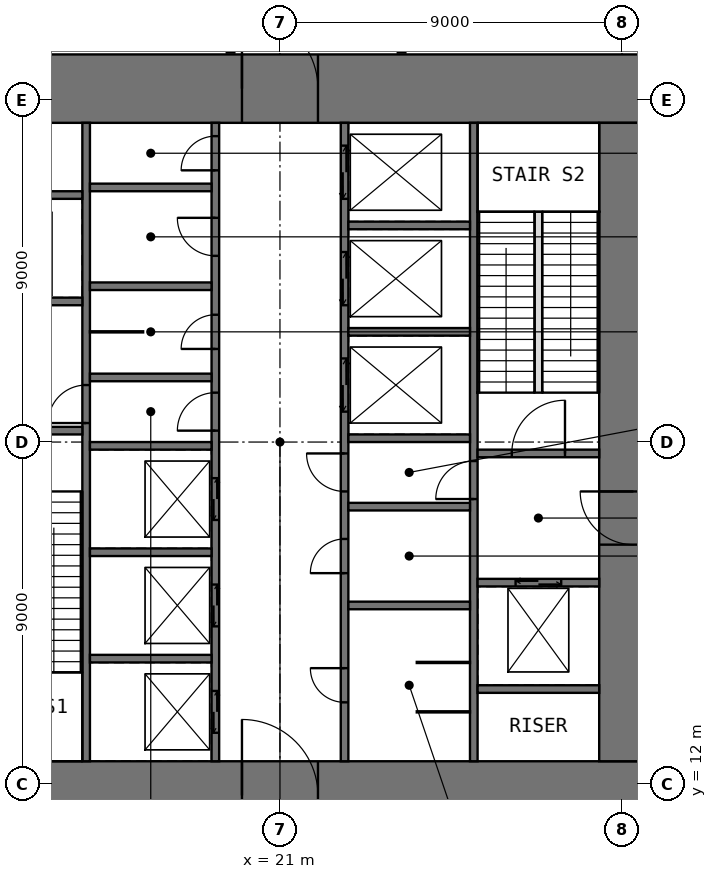
"""IFC4 building model, lengths in metres.
Left out: names, types, materials, properties, quantities, classifications, styles, units other than length and angle.
Written with IfcOpenShell. Run it as: python <this file> out.ifc"""

import sys

from ifc_helpers import new_model, si_unit, direction, frame, frame_2d, origin, place, context, subcontext, project, spatial, rectangle, extrude, element, fill, save


model = new_model("IFC4")
c1 = context("Model", 3, precision=1e-05, world=origin(), true_north=direction((0.0, 1.0)))
c2 = subcontext(c1, "Body", "Model", "MODEL_VIEW")
j1 = project(units=[si_unit("LENGTHUNIT", "METRE"), si_unit("PLANEANGLEUNIT", "RADIAN")], contexts=[c1])
p1 = place(None, origin())
s1 = spatial("IfcSite", under=j1, at=p1, CompositionType="ELEMENT")
p2 = place(p1, origin())
s2 = spatial("IfcBuilding", under=s1, at=p2, CompositionType="ELEMENT")
p3 = place(p2, origin())
s3 = spatial("IfcBuildingStorey", under=s2, at=p3, CompositionType="ELEMENT", Elevation=0.0)
p4 = place(p3, frame((10.8, 11.7, 0.0), z_axis=(0.0, 0.0, 1.0), x_axis=(1.0, 0.0, 0.0)))
e1 = element("IfcWall", 1, at=p4, inside=s3, PredefinedType="SHEAR", context=c2, shape_type="SweptSolid", body=[
    extrude(rectangle(XDim=20.4, YDim=1.8, at=frame_2d((10.2, 0.0))), origin(), (0.0, 0.0, 1.0), 5.8),
])
p5 = place(p4, frame((9.2, 0.0, 0.0)))
e2 = element("IfcOpeningElement", 2, at=p5, cuts=e1, PredefinedType="OPENING", context=c2, shape_type="SweptSolid", body=[
    extrude(rectangle(XDim=2.0, YDim=2.2, at=frame_2d((1.0, 1.1))), frame((0.0, 0.91, 0.0), z_axis=(0.0, -1.0, 0.0), x_axis=(1.0, 0.0, 0.0)), (0.0, 0.0, 1.0), 1.82),
])
p6 = place(p3, frame((10.8, 30.3, 0.0), z_axis=(0.0, 0.0, 1.0), x_axis=(1.0, 0.0, 0.0)))
e3 = element("IfcWall", 3, at=p6, inside=s3, PredefinedType="SHEAR", context=c2, shape_type="SweptSolid", body=[
    extrude(rectangle(XDim=20.4, YDim=1.8, at=frame_2d((10.2, 0.0))), origin(), (0.0, 0.0, 1.0), 5.8),
])
p7 = place(p6, frame((9.2, 0.0, 0.0)))
e4 = element("IfcOpeningElement", 4, at=p7, cuts=e3, PredefinedType="OPENING", context=c2, shape_type="SweptSolid", body=[
    extrude(rectangle(XDim=2.0, YDim=2.2, at=frame_2d((1.0, 1.1))), frame((0.0, 0.91, 0.0), z_axis=(0.0, -1.0, 0.0), x_axis=(1.0, 0.0, 0.0)), (0.0, 0.0, 1.0), 1.82),
])
p8 = place(p3, frame((30.3, 12.6, 0.0), z_axis=(0.0, 0.0, 1.0), x_axis=(0.0, 1.0, 0.0)))
e5 = element("IfcWall", 5, at=p8, inside=s3, PredefinedType="SHEAR", context=c2, shape_type="SweptSolid", body=[
    extrude(rectangle(XDim=16.8, YDim=1.8, at=frame_2d((8.4, 0.0))), origin(), (0.0, 0.0, 1.0), 5.8),
])
p9 = place(p8, frame((5.7, 0.0, 0.0)))
e6 = element("IfcOpeningElement", 6, at=p9, cuts=e5, PredefinedType="OPENING", context=c2, shape_type="SweptSolid", body=[
    extrude(rectangle(XDim=1.4, YDim=2.2, at=frame_2d((0.7, 1.1))), frame((0.0, 0.91, 0.0), z_axis=(0.0, -1.0, 0.0), x_axis=(1.0, 0.0, 0.0)), (0.0, 0.0, 1.0), 1.82),
])
p10 = place(p3, frame((15.9, 12.6, 0.0), z_axis=(0.0, 0.0, 1.0), x_axis=(0.0, 1.0, 0.0)))
e7 = element("IfcWall", 7, at=p10, inside=s3, PredefinedType="SHEAR", context=c2, shape_type="SweptSolid", body=[
    extrude(rectangle(XDim=16.8, YDim=0.2, at=frame_2d((8.4, 0.0))), origin(), (0.0, 0.0, 1.0), 5.8),
])
p11 = place(p10, frame((8.9, 0.0, 0.0)))
e8 = element("IfcOpeningElement", 8, at=p11, cuts=e7, PredefinedType="OPENING", context=c2, shape_type="SweptSolid", body=[
    extrude(rectangle(XDim=1.0, YDim=2.2, at=frame_2d((0.5, 1.1))), frame((0.0, 0.11, 0.0), z_axis=(0.0, -1.0, 0.0), x_axis=(1.0, 0.0, 0.0)), (0.0, 0.0, 1.0), 0.22),
])
p12 = place(p3, frame((19.3, 12.6, 0.0), z_axis=(0.0, 0.0, 1.0), x_axis=(0.0, 1.0, 0.0)))
e9 = element("IfcWall", 9, at=p12, inside=s3, PredefinedType="SHEAR", context=c2, shape_type="SweptSolid", body=[
    extrude(rectangle(XDim=16.8, YDim=0.2, at=frame_2d((8.4, 0.0))), origin(), (0.0, 0.0, 1.0), 5.8),
])
p13 = place(p12, frame((8.7, 0.0, 0.0)))
e10 = element("IfcOpeningElement", 10, at=p13, cuts=e9, PredefinedType="OPENING", context=c2, shape_type="SweptSolid", body=[
    extrude(rectangle(XDim=1.0, YDim=2.2, at=frame_2d((0.5, 1.1))), frame((0.0, 0.11, 0.0), z_axis=(0.0, -1.0, 0.0), x_axis=(1.0, 0.0, 0.0)), (0.0, 0.0, 1.0), 0.22),
])
p14 = place(p12, frame((10.85, 0.0, 0.0)))
e11 = element("IfcOpeningElement", 11, at=p14, cuts=e9, PredefinedType="OPENING", context=c2, shape_type="SweptSolid", body=[
    extrude(rectangle(XDim=0.9, YDim=2.2, at=frame_2d((0.45, 1.1))), frame((0.0, 0.11, 0.0), z_axis=(0.0, -1.0, 0.0), x_axis=(1.0, 0.0, 0.0)), (0.0, 0.0, 1.0), 0.22),
])
p15 = place(p12, frame((13.3, 0.0, 0.0)))
e12 = element("IfcOpeningElement", 12, at=p15, cuts=e9, PredefinedType="OPENING", context=c2, shape_type="SweptSolid", body=[
    extrude(rectangle(XDim=1.0, YDim=2.2, at=frame_2d((0.5, 1.1))), frame((0.0, 0.11, 0.0), z_axis=(0.0, -1.0, 0.0), x_axis=(1.0, 0.0, 0.0)), (0.0, 0.0, 1.0), 0.22),
])
p16 = place(p12, frame((15.55, 0.0, 0.0)))
e13 = element("IfcOpeningElement", 13, at=p16, cuts=e9, PredefinedType="OPENING", context=c2, shape_type="SweptSolid", body=[
    extrude(rectangle(XDim=0.9, YDim=2.2, at=frame_2d((0.45, 1.1))), frame((0.0, 0.11, 0.0), z_axis=(0.0, -1.0, 0.0), x_axis=(1.0, 0.0, 0.0)), (0.0, 0.0, 1.0), 0.22),
])
p17 = place(p12, frame((0.75, 0.0, 0.0)))
e14 = element("IfcOpeningElement", 14, at=p17, cuts=e9, PredefinedType="OPENING", context=c2, shape_type="SweptSolid", body=[
    extrude(rectangle(XDim=1.1, YDim=2.2, at=frame_2d((0.55, 1.1))), frame((0.0, 0.11, 0.0), z_axis=(0.0, -1.0, 0.0), x_axis=(1.0, 0.0, 0.0)), (0.0, 0.0, 1.0), 0.22),
])
p18 = place(p12, frame((3.55, 0.0, 0.0)))
e15 = element("IfcOpeningElement", 15, at=p18, cuts=e9, PredefinedType="OPENING", context=c2, shape_type="SweptSolid", body=[
    extrude(rectangle(XDim=1.1, YDim=2.2, at=frame_2d((0.55, 1.1))), frame((0.0, 0.11, 0.0), z_axis=(0.0, -1.0, 0.0), x_axis=(1.0, 0.0, 0.0)), (0.0, 0.0, 1.0), 0.22),
])
p19 = place(p12, frame((6.35, 0.0, 0.0)))
e16 = element("IfcOpeningElement", 16, at=p19, cuts=e9, PredefinedType="OPENING", context=c2, shape_type="SweptSolid", body=[
    extrude(rectangle(XDim=1.1, YDim=2.2, at=frame_2d((0.55, 1.1))), frame((0.0, 0.11, 0.0), z_axis=(0.0, -1.0, 0.0), x_axis=(1.0, 0.0, 0.0)), (0.0, 0.0, 1.0), 0.22),
])
p20 = place(p3, frame((22.7, 12.6, 0.0), z_axis=(0.0, 0.0, 1.0), x_axis=(0.0, 1.0, 0.0)))
e17 = element("IfcWall", 17, at=p20, inside=s3, PredefinedType="SHEAR", context=c2, shape_type="SweptSolid", body=[
    extrude(rectangle(XDim=16.8, YDim=0.2, at=frame_2d((8.4, 0.0))), origin(), (0.0, 0.0, 1.0), 5.8),
])
p21 = place(p20, frame((7.1, 0.0, 0.0)))
e18 = element("IfcOpeningElement", 18, at=p21, cuts=e17, PredefinedType="OPENING", context=c2, shape_type="SweptSolid", body=[
    extrude(rectangle(XDim=1.0, YDim=2.2, at=frame_2d((0.5, 1.1))), frame((0.0, 0.11, 0.0), z_axis=(0.0, -1.0, 0.0), x_axis=(1.0, 0.0, 0.0)), (0.0, 0.0, 1.0), 0.22),
])
p22 = place(p20, frame((1.55, 0.0, 0.0)))
e19 = element("IfcOpeningElement", 19, at=p22, cuts=e17, PredefinedType="OPENING", context=c2, shape_type="SweptSolid", body=[
    extrude(rectangle(XDim=0.9, YDim=2.2, at=frame_2d((0.45, 1.1))), frame((0.0, 0.11, 0.0), z_axis=(0.0, -1.0, 0.0), x_axis=(1.0, 0.0, 0.0)), (0.0, 0.0, 1.0), 0.22),
])
p23 = place(p20, frame((4.95, 0.0, 0.0)))
e20 = element("IfcOpeningElement", 20, at=p23, cuts=e17, PredefinedType="OPENING", context=c2, shape_type="SweptSolid", body=[
    extrude(rectangle(XDim=0.9, YDim=2.2, at=frame_2d((0.45, 1.1))), frame((0.0, 0.11, 0.0), z_axis=(0.0, -1.0, 0.0), x_axis=(1.0, 0.0, 0.0)), (0.0, 0.0, 1.0), 0.22),
])
p24 = place(p20, frame((9.2, 0.0, 0.0)))
e21 = element("IfcOpeningElement", 21, at=p24, cuts=e17, PredefinedType="OPENING", context=c2, shape_type="SweptSolid", body=[
    extrude(rectangle(XDim=1.4, YDim=2.4, at=frame_2d((0.7, 1.2))), frame((0.0, 0.11, 0.0), z_axis=(0.0, -1.0, 0.0), x_axis=(1.0, 0.0, 0.0)), (0.0, 0.0, 1.0), 0.22),
])
p25 = place(p20, frame((12.0, 0.0, 0.0)))
e22 = element("IfcOpeningElement", 22, at=p25, cuts=e17, PredefinedType="OPENING", context=c2, shape_type="SweptSolid", body=[
    extrude(rectangle(XDim=1.4, YDim=2.4, at=frame_2d((0.7, 1.2))), frame((0.0, 0.11, 0.0), z_axis=(0.0, -1.0, 0.0), x_axis=(1.0, 0.0, 0.0)), (0.0, 0.0, 1.0), 0.22),
])
p26 = place(p20, frame((14.8, 0.0, 0.0)))
e23 = element("IfcOpeningElement", 23, at=p26, cuts=e17, PredefinedType="OPENING", context=c2, shape_type="SweptSolid", body=[
    extrude(rectangle(XDim=1.4, YDim=2.4, at=frame_2d((0.7, 1.2))), frame((0.0, 0.11, 0.0), z_axis=(0.0, -1.0, 0.0), x_axis=(1.0, 0.0, 0.0)), (0.0, 0.0, 1.0), 0.22),
])
p27 = place(p3, frame((26.1, 12.6, 0.0), z_axis=(0.0, 0.0, 1.0), x_axis=(0.0, 1.0, 0.0)))
e24 = element("IfcWall", 24, at=p27, inside=s3, PredefinedType="SHEAR", context=c2, shape_type="SweptSolid", body=[
    extrude(rectangle(XDim=16.8, YDim=0.2, at=frame_2d((8.4, 0.0))), origin(), (0.0, 0.0, 1.0), 5.8),
])
p28 = place(p27, frame((6.9, 0.0, 0.0)))
e25 = element("IfcOpeningElement", 25, at=p28, cuts=e24, PredefinedType="OPENING", context=c2, shape_type="SweptSolid", body=[
    extrude(rectangle(XDim=1.0, YDim=2.2, at=frame_2d((0.5, 1.1))), frame((0.0, 0.11, 0.0), z_axis=(0.0, -1.0, 0.0), x_axis=(1.0, 0.0, 0.0)), (0.0, 0.0, 1.0), 0.22),
])
p29 = place(p3, frame((12.6, 21.3, 0.0), z_axis=(0.0, 0.0, 1.0), x_axis=(1.0, 0.0, 0.0)))
e26 = element("IfcWall", 26, at=p29, inside=s3, PredefinedType="SHEAR", context=c2, shape_type="SweptSolid", body=[
    extrude(rectangle(XDim=3.2, YDim=0.2, at=frame_2d((1.6, 0.0))), origin(), (0.0, 0.0, 1.0), 5.8),
])
p30 = place(p29, frame((0.9, 0.0, 0.0)))
e27 = element("IfcOpeningElement", 27, at=p30, cuts=e26, PredefinedType="OPENING", context=c2, shape_type="SweptSolid", body=[
    extrude(rectangle(XDim=1.4, YDim=2.2, at=frame_2d((0.7, 1.1))), frame((0.0, 0.11, 0.0), z_axis=(0.0, -1.0, 0.0), x_axis=(1.0, 0.0, 0.0)), (0.0, 0.0, 1.0), 0.22),
])
p31 = place(p3, frame((12.6, 24.7, 0.0), z_axis=(0.0, 0.0, 1.0), x_axis=(1.0, 0.0, 0.0)))
e28 = element("IfcWall", 28, at=p31, inside=s3, PredefinedType="SHEAR", context=c2, shape_type="SweptSolid", body=[
    extrude(rectangle(XDim=3.2, YDim=0.2, at=frame_2d((1.6, 0.0))), origin(), (0.0, 0.0, 1.0), 5.8),
])
p32 = place(p31, frame((1.0, 0.0, 0.0)))
e29 = element("IfcOpeningElement", 29, at=p32, cuts=e28, PredefinedType="OPENING", context=c2, shape_type="SweptSolid", body=[
    extrude(rectangle(XDim=1.2, YDim=2.2, at=frame_2d((0.6, 1.1))), frame((0.0, 0.11, 0.0), z_axis=(0.0, -1.0, 0.0), x_axis=(1.0, 0.0, 0.0)), (0.0, 0.0, 1.0), 0.22),
])
for number, where, z_axis, x_axis in (
    (30, (12.6, 27.5, 0.0), (0.0, 0.0, 1.0), (1.0, 0.0, 0.0)),
    (31, (16.0, 15.3, 0.0), (0.0, 0.0, 1.0), (1.0, 0.0, 0.0)),
    (32, (16.0, 18.1, 0.0), (0.0, 0.0, 1.0), (1.0, 0.0, 0.0)),
    (33, (16.0, 20.9, 0.0), (0.0, 0.0, 1.0), (1.0, 0.0, 0.0)),
    (34, (16.0, 22.7, 0.0), (0.0, 0.0, 1.0), (1.0, 0.0, 0.0)),
    (35, (16.0, 25.1, 0.0), (0.0, 0.0, 1.0), (1.0, 0.0, 0.0)),
    (36, (16.0, 27.7, 0.0), (0.0, 0.0, 1.0), (1.0, 0.0, 0.0)),
    (37, (22.8, 16.7, 0.0), (0.0, 0.0, 1.0), (1.0, 0.0, 0.0)),
    (38, (22.8, 19.3, 0.0), (0.0, 0.0, 1.0), (1.0, 0.0, 0.0)),
    (39, (22.8, 21.1, 0.0), (0.0, 0.0, 1.0), (1.0, 0.0, 0.0)),
    (40, (22.8, 23.9, 0.0), (0.0, 0.0, 1.0), (1.0, 0.0, 0.0)),
    (41, (22.8, 26.7, 0.0), (0.0, 0.0, 1.0), (1.0, 0.0, 0.0)),
    (42, (26.2, 14.5, 0.0), (0.0, 0.0, 1.0), (1.0, 0.0, 0.0)),
):
    element("IfcWall", number, at=place(p3, frame(where, z_axis=z_axis, x_axis=x_axis)), inside=s3, PredefinedType="SHEAR", context=c2, shape_type="SweptSolid", body=[
        extrude(rectangle(XDim=3.2, YDim=0.2, at=frame_2d((1.6, 0.0))), origin(), (0.0, 0.0, 1.0), 5.8),
    ])
p33 = place(p3, frame((26.2, 17.3, 0.0), z_axis=(0.0, 0.0, 1.0), x_axis=(1.0, 0.0, 0.0)))
e43 = element("IfcWall", 43, at=p33, inside=s3, PredefinedType="SHEAR", context=c2, shape_type="SweptSolid", body=[
    extrude(rectangle(XDim=3.2, YDim=0.2, at=frame_2d((1.6, 0.0))), origin(), (0.0, 0.0, 1.0), 5.8),
])
p34 = place(p33, frame((1.0, 0.0, 0.0)))
e44 = element("IfcOpeningElement", 44, at=p34, cuts=e43, PredefinedType="OPENING", context=c2, shape_type="SweptSolid", body=[
    extrude(rectangle(XDim=1.2, YDim=2.2, at=frame_2d((0.6, 1.1))), frame((0.0, 0.11, 0.0), z_axis=(0.0, -1.0, 0.0), x_axis=(1.0, 0.0, 0.0)), (0.0, 0.0, 1.0), 0.22),
])
p35 = place(p3, frame((26.2, 20.7, 0.0), z_axis=(0.0, 0.0, 1.0), x_axis=(1.0, 0.0, 0.0)))
e45 = element("IfcWall", 45, at=p35, inside=s3, PredefinedType="SHEAR", context=c2, shape_type="SweptSolid", body=[
    extrude(rectangle(XDim=3.2, YDim=0.2, at=frame_2d((1.6, 0.0))), origin(), (0.0, 0.0, 1.0), 5.8),
])
p36 = place(p35, frame((0.9, 0.0, 0.0)))
e46 = element("IfcOpeningElement", 46, at=p36, cuts=e45, PredefinedType="OPENING", context=c2, shape_type="SweptSolid", body=[
    extrude(rectangle(XDim=1.4, YDim=2.2, at=frame_2d((0.7, 1.1))), frame((0.0, 0.11, 0.0), z_axis=(0.0, -1.0, 0.0), x_axis=(1.0, 0.0, 0.0)), (0.0, 0.0, 1.0), 0.22),
])
for number, where, z_axis, x_axis in (
    (47, (24.6, 13.9, 0.0), (0.0, 0.0, 1.0), (1.0, 0.0, 0.0)),
    (48, (24.6, 15.2, 0.0), (0.0, 0.0, 1.0), (1.0, 0.0, 0.0)),
    (49, (16.0, 23.9, 0.0), (0.0, 0.0, 1.0), (1.0, 0.0, 0.0)),
):
    element("IfcWall", number, at=place(p3, frame(where, z_axis=z_axis, x_axis=x_axis)), inside=s3, PredefinedType="PARTITIONING", context=c2, shape_type="SweptSolid", body=[
        extrude(rectangle(XDim=1.4, YDim=0.03, at=frame_2d((0.7, 0.0))), origin(), (0.0, 0.0, 1.0), 5.6),
    ])
p37 = place(p3, frame((27.8, 22.3, 0.0), z_axis=(0.0, 0.0, 1.0), x_axis=(0.0, 1.0, 0.0)))
e50 = element("IfcWall", 50, at=p37, inside=s3, PredefinedType="PARTITIONING", context=c2, shape_type="SweptSolid", body=[
    extrude(rectangle(XDim=4.76, YDim=0.2, at=frame_2d((2.38, 0.0))), origin(), (0.0, 0.0, 1.0), 6.0),
])
p38 = place(p5, origin())
e51 = element("IfcDoor", 51, at=p38, inside=s3, OperationType="DOUBLE_DOOR_SINGLE_SWING", PredefinedType="DOOR", context=c2, shape_type="SweptSolid", body=[
    extrude(rectangle(XDim=2.0, YDim=2.2, at=frame_2d((1.0, 1.1))), frame((0.0, 0.025, 0.0), z_axis=(0.0, -1.0, 0.0), x_axis=(1.0, 0.0, 0.0)), (0.0, 0.0, 1.0), 0.05),
])
fill(e2, e51)
p39 = place(p7, origin())
e52 = element("IfcDoor", 52, at=p39, inside=s3, OperationType="DOUBLE_DOOR_SINGLE_SWING", PredefinedType="DOOR", context=c2, shape_type="SweptSolid", body=[
    extrude(rectangle(XDim=2.0, YDim=2.2, at=frame_2d((1.0, 1.1))), frame((0.0, 0.025, 0.0), z_axis=(0.0, -1.0, 0.0), x_axis=(1.0, 0.0, 0.0)), (0.0, 0.0, 1.0), 0.05),
])
fill(e4, e52)
p40 = place(p9, origin())
e53 = element("IfcDoor", 53, at=p40, inside=s3, OperationType="SINGLE_SWING_RIGHT", PredefinedType="DOOR", context=c2, shape_type="SweptSolid", body=[
    extrude(rectangle(XDim=1.4, YDim=2.2, at=frame_2d((0.7, 1.1))), frame((0.0, 0.025, 0.0), z_axis=(0.0, -1.0, 0.0), x_axis=(1.0, 0.0, 0.0)), (0.0, 0.0, 1.0), 0.05),
])
fill(e6, e53)
p41 = place(p36, origin())
e54 = element("IfcDoor", 54, at=p41, inside=s3, OperationType="SINGLE_SWING_RIGHT", PredefinedType="DOOR", context=c2, shape_type="SweptSolid", body=[
    extrude(rectangle(XDim=1.4, YDim=2.2, at=frame_2d((0.7, 1.1))), frame((0.0, 0.025, 0.0), z_axis=(0.0, -1.0, 0.0), x_axis=(1.0, 0.0, 0.0)), (0.0, 0.0, 1.0), 0.05),
])
fill(e46, e54)
p42 = place(p11, origin())
e55 = element("IfcDoor", 55, at=p42, inside=s3, OperationType="SINGLE_SWING_LEFT", PredefinedType="DOOR", context=c2, shape_type="SweptSolid", body=[
    extrude(rectangle(XDim=1.0, YDim=2.2, at=frame_2d((0.5, 1.1))), frame((0.0, 0.025, 0.0), z_axis=(0.0, -1.0, 0.0), x_axis=(1.0, 0.0, 0.0)), (0.0, 0.0, 1.0), 0.05),
])
fill(e8, e55)
p43 = place(p28, origin())
e56 = element("IfcDoor", 56, at=p43, inside=s3, OperationType="SINGLE_SWING_LEFT", PredefinedType="DOOR", context=c2, shape_type="SweptSolid", body=[
    extrude(rectangle(XDim=1.0, YDim=2.2, at=frame_2d((0.5, 1.1))), frame((0.0, 0.025, 0.0), z_axis=(0.0, -1.0, 0.0), x_axis=(1.0, 0.0, 0.0)), (0.0, 0.0, 1.0), 0.05),
])
fill(e25, e56)
p44 = place(p13, origin())
e57 = element("IfcDoor", 57, at=p44, inside=s3, OperationType="SINGLE_SWING_LEFT", PredefinedType="DOOR", context=c2, shape_type="SweptSolid", body=[
    extrude(rectangle(XDim=1.0, YDim=2.2, at=frame_2d((0.5, 1.1))), frame((0.0, 0.025, 0.0), z_axis=(0.0, -1.0, 0.0), x_axis=(1.0, 0.0, 0.0)), (0.0, 0.0, 1.0), 0.05),
])
fill(e10, e57)
p45 = place(p21, origin())
e58 = element("IfcDoor", 58, at=p45, inside=s3, OperationType="SINGLE_SWING_RIGHT", PredefinedType="DOOR", context=c2, shape_type="SweptSolid", body=[
    extrude(rectangle(XDim=1.0, YDim=2.2, at=frame_2d((0.5, 1.1))), frame((0.0, 0.025, 0.0), z_axis=(0.0, -1.0, 0.0), x_axis=(1.0, 0.0, 0.0)), (0.0, 0.0, 1.0), 0.05),
])
fill(e18, e58)
p46 = place(p14, origin())
e59 = element("IfcDoor", 59, at=p46, inside=s3, OperationType="SINGLE_SWING_LEFT", PredefinedType="DOOR", context=c2, shape_type="SweptSolid", body=[
    extrude(rectangle(XDim=0.9, YDim=2.2, at=frame_2d((0.45, 1.1))), frame((0.0, 0.025, 0.0), z_axis=(0.0, -1.0, 0.0), x_axis=(1.0, 0.0, 0.0)), (0.0, 0.0, 1.0), 0.05),
])
fill(e11, e59)
p47 = place(p15, origin())
e60 = element("IfcDoor", 60, at=p47, inside=s3, OperationType="SINGLE_SWING_RIGHT", PredefinedType="DOOR", context=c2, shape_type="SweptSolid", body=[
    extrude(rectangle(XDim=1.0, YDim=2.2, at=frame_2d((0.5, 1.1))), frame((0.0, 0.025, 0.0), z_axis=(0.0, -1.0, 0.0), x_axis=(1.0, 0.0, 0.0)), (0.0, 0.0, 1.0), 0.05),
])
fill(e12, e60)
p48 = place(p16, origin())
e61 = element("IfcDoor", 61, at=p48, inside=s3, OperationType="SINGLE_SWING_LEFT", PredefinedType="DOOR", context=c2, shape_type="SweptSolid", body=[
    extrude(rectangle(XDim=0.9, YDim=2.2, at=frame_2d((0.45, 1.1))), frame((0.0, 0.025, 0.0), z_axis=(0.0, -1.0, 0.0), x_axis=(1.0, 0.0, 0.0)), (0.0, 0.0, 1.0), 0.05),
])
fill(e13, e61)
p49 = place(p22, origin())
e62 = element("IfcDoor", 62, at=p49, inside=s3, OperationType="SINGLE_SWING_RIGHT", PredefinedType="DOOR", context=c2, shape_type="SweptSolid", body=[
    extrude(rectangle(XDim=0.9, YDim=2.2, at=frame_2d((0.45, 1.1))), frame((0.0, 0.025, 0.0), z_axis=(0.0, -1.0, 0.0), x_axis=(1.0, 0.0, 0.0)), (0.0, 0.0, 1.0), 0.05),
])
fill(e19, e62)
p50 = place(p23, origin())
e63 = element("IfcDoor", 63, at=p50, inside=s3, OperationType="SINGLE_SWING_LEFT", PredefinedType="DOOR", context=c2, shape_type="SweptSolid", body=[
    extrude(rectangle(XDim=0.9, YDim=2.2, at=frame_2d((0.45, 1.1))), frame((0.0, 0.025, 0.0), z_axis=(0.0, -1.0, 0.0), x_axis=(1.0, 0.0, 0.0)), (0.0, 0.0, 1.0), 0.05),
])
fill(e20, e63)
p51 = place(p17, origin())
e64 = element("IfcDoor", 64, at=p51, inside=s3, OperationType="DOUBLE_DOOR_SLIDING", PredefinedType="DOOR", context=c2, shape_type="SweptSolid", body=[
    extrude(rectangle(XDim=1.1, YDim=2.2, at=frame_2d((0.55, 1.1))), frame((0.0, 0.025, 0.0), z_axis=(0.0, -1.0, 0.0), x_axis=(1.0, 0.0, 0.0)), (0.0, 0.0, 1.0), 0.05),
])
fill(e14, e64)
p52 = place(p18, origin())
e65 = element("IfcDoor", 65, at=p52, inside=s3, OperationType="DOUBLE_DOOR_SLIDING", PredefinedType="DOOR", context=c2, shape_type="SweptSolid", body=[
    extrude(rectangle(XDim=1.1, YDim=2.2, at=frame_2d((0.55, 1.1))), frame((0.0, 0.025, 0.0), z_axis=(0.0, -1.0, 0.0), x_axis=(1.0, 0.0, 0.0)), (0.0, 0.0, 1.0), 0.05),
])
fill(e15, e65)
p53 = place(p19, origin())
e66 = element("IfcDoor", 66, at=p53, inside=s3, OperationType="DOUBLE_DOOR_SLIDING", PredefinedType="DOOR", context=c2, shape_type="SweptSolid", body=[
    extrude(rectangle(XDim=1.1, YDim=2.2, at=frame_2d((0.55, 1.1))), frame((0.0, 0.025, 0.0), z_axis=(0.0, -1.0, 0.0), x_axis=(1.0, 0.0, 0.0)), (0.0, 0.0, 1.0), 0.05),
])
fill(e16, e66)
p54 = place(p24, origin())
e67 = element("IfcDoor", 67, at=p54, inside=s3, OperationType="DOUBLE_DOOR_SLIDING", PredefinedType="DOOR", context=c2, shape_type="SweptSolid", body=[
    extrude(rectangle(XDim=1.4, YDim=2.4, at=frame_2d((0.7, 1.2))), frame((0.0, 0.025, 0.0), z_axis=(0.0, -1.0, 0.0), x_axis=(1.0, 0.0, 0.0)), (0.0, 0.0, 1.0), 0.05),
])
fill(e21, e67)
p55 = place(p25, origin())
e68 = element("IfcDoor", 68, at=p55, inside=s3, OperationType="DOUBLE_DOOR_SLIDING", PredefinedType="DOOR", context=c2, shape_type="SweptSolid", body=[
    extrude(rectangle(XDim=1.4, YDim=2.4, at=frame_2d((0.7, 1.2))), frame((0.0, 0.025, 0.0), z_axis=(0.0, -1.0, 0.0), x_axis=(1.0, 0.0, 0.0)), (0.0, 0.0, 1.0), 0.05),
])
fill(e22, e68)
p56 = place(p26, origin())
e69 = element("IfcDoor", 69, at=p56, inside=s3, OperationType="DOUBLE_DOOR_SLIDING", PredefinedType="DOOR", context=c2, shape_type="SweptSolid", body=[
    extrude(rectangle(XDim=1.4, YDim=2.4, at=frame_2d((0.7, 1.2))), frame((0.0, 0.025, 0.0), z_axis=(0.0, -1.0, 0.0), x_axis=(1.0, 0.0, 0.0)), (0.0, 0.0, 1.0), 0.05),
])
fill(e23, e69)
p57 = place(p34, origin())
e70 = element("IfcDoor", 70, at=p57, inside=s3, OperationType="DOUBLE_DOOR_SLIDING", PredefinedType="DOOR", context=c2, shape_type="SweptSolid", body=[
    extrude(rectangle(XDim=1.2, YDim=2.2, at=frame_2d((0.6, 1.1))), frame((0.0, 0.025, 0.0), z_axis=(0.0, -1.0, 0.0), x_axis=(1.0, 0.0, 0.0)), (0.0, 0.0, 1.0), 0.05),
])
fill(e44, e70)
save(model, sys.argv[1])
